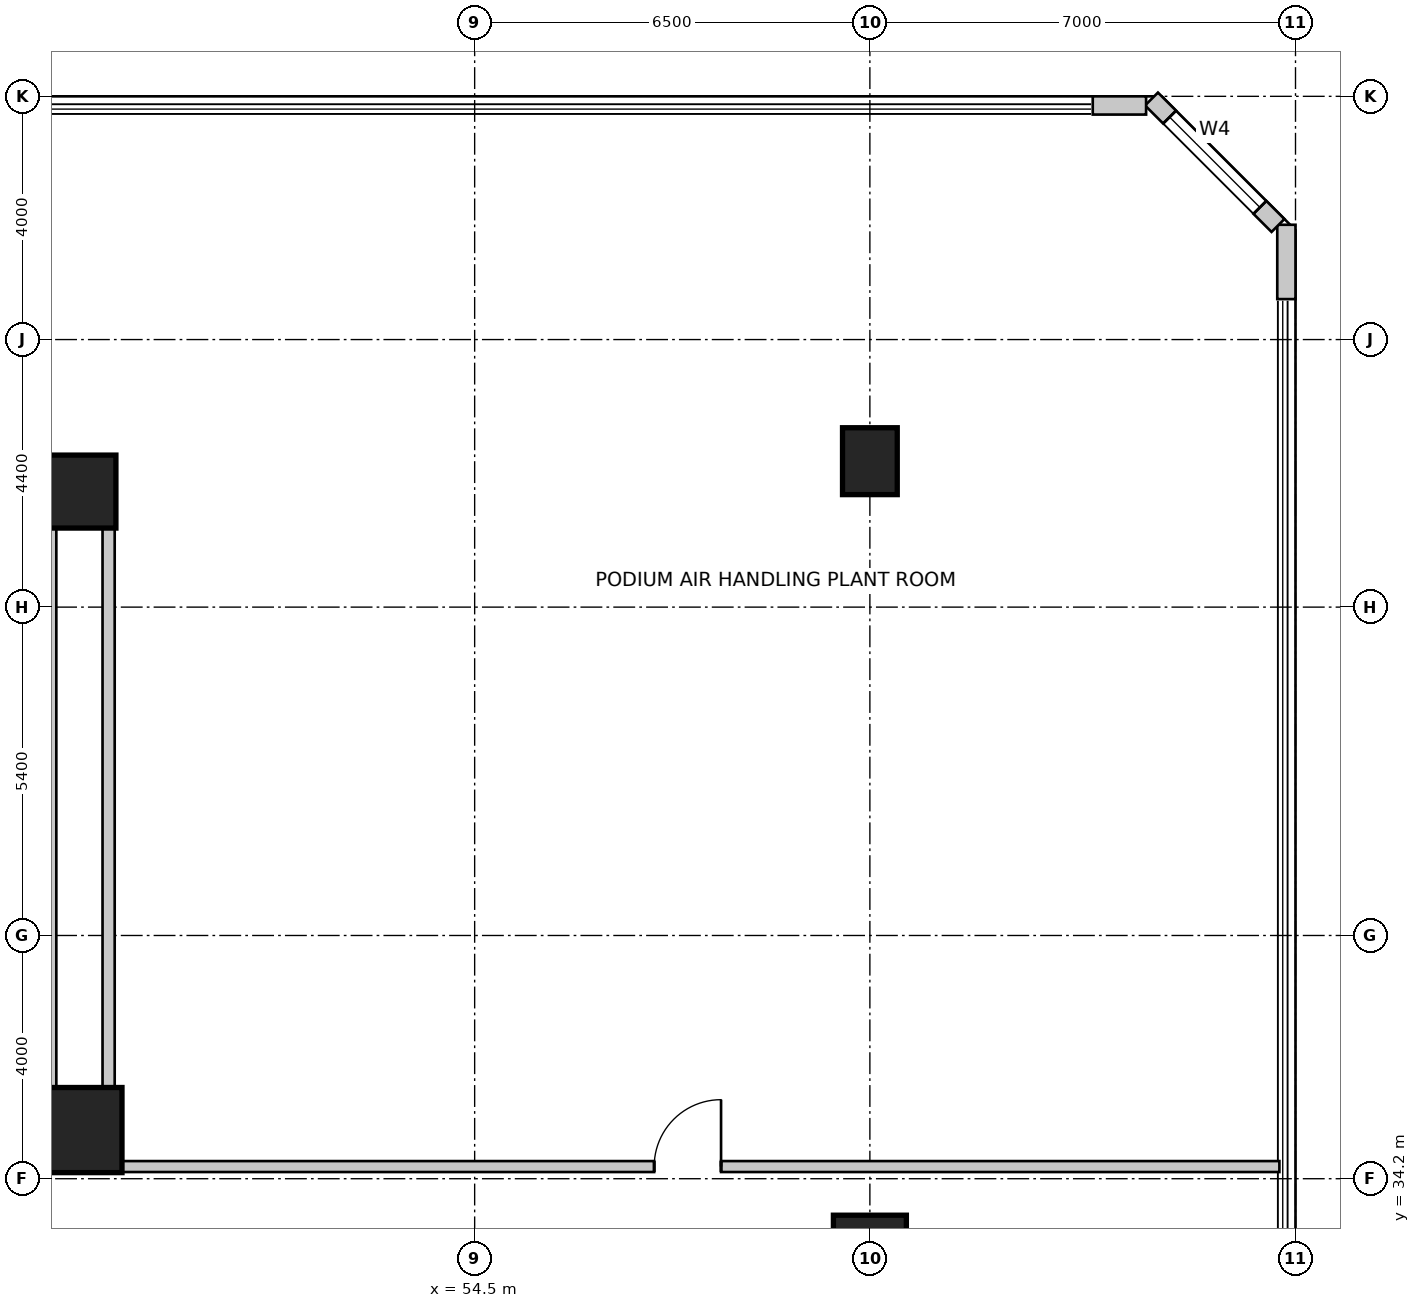
"""IFC4 building model, lengths in metres.
Left out: names, types, materials, properties, quantities, classifications, styles, units other than length and angle.
Written with IfcOpenShell. Run it as: python <this file> out.ifc"""

import sys

from ifc_helpers import new_model, si_unit, direction, frame, frame_2d, origin, origin_2d, place, context, subcontext, project, spatial, rectangle, extrude, source, transform, mapped, element, fill, save


model = new_model("IFC4")
c1 = context("Model", 3, precision=1e-05, world=origin(), true_north=direction((0.0, 1.0)))
c2 = subcontext(c1, "Body", "Model", "MODEL_VIEW")
j1 = project(units=[si_unit("LENGTHUNIT", "METRE"), si_unit("PLANEANGLEUNIT", "RADIAN")], contexts=[c1])
p1 = place(None, origin())
s1 = spatial("IfcSite", under=j1, at=p1, CompositionType="ELEMENT")
p2 = place(p1, origin())
s2 = spatial("IfcBuilding", under=s1, at=p2, CompositionType="ELEMENT")
p3 = place(p2, frame((0.0, 0.0, 21.6)))
s3 = spatial("IfcBuildingStorey", under=s2, at=p3, CompositionType="ELEMENT", Elevation=21.6)
m1 = source(origin(), c2, "Body", "SweptSolid", [
    extrude(rectangle(XDim=1.4, YDim=1.4, at=origin_2d()), origin(), (0.0, 0.0, 1.0), 5.4),
])
p4 = place(p3, frame((48.0, 35.0, 0.0), z_axis=(0.0, 0.0, 1.0), x_axis=(1.0, 0.0, 0.0)))
e1 = element("IfcColumn", 1, at=p4, inside=s3, PredefinedType="COLUMN", context=c2, shape_type="MappedRepresentation", body=[
    mapped(m1, transform((0.0, 0.0, 0.0), scale=1.0)),
])
m2 = source(origin(), c2, "Body", "SweptSolid", [
    extrude(rectangle(XDim=1.2, YDim=1.2, at=origin_2d()), origin(), (0.0, 0.0, 1.0), 5.4),
])
for number, where, z_axis, x_axis in (
    (2, (61.0, 33.0, 0.0), (0.0, 0.0, 1.0), (1.0, 0.0, 0.0)),
    (3, (48.0, 45.5, 0.0), (0.0, 0.0, 1.0), (1.0, 0.0, 0.0)),
):
    element("IfcColumn", number, at=place(p3, frame(where, z_axis=z_axis, x_axis=x_axis)), inside=s3, PredefinedType="COLUMN", context=c2, shape_type="MappedRepresentation", body=[
        mapped(m2, transform((0.0, 0.0, 0.0), scale=1.0)),
    ])
m3 = source(origin(), c2, "Body", "SweptSolid", [
    extrude(rectangle(XDim=0.9, YDim=1.1, at=origin_2d()), origin(), (0.0, 0.0, 1.0), 5.4),
])
p5 = place(p3, frame((61.0, 46.0, 0.0), z_axis=(0.0, 0.0, 1.0), x_axis=(1.0, 0.0, 0.0)))
e4 = element("IfcColumn", 4, at=p5, inside=s3, PredefinedType="COLUMN", context=c2, shape_type="MappedRepresentation", body=[
    mapped(m3, transform((0.0, 0.0, 0.0), scale=1.0)),
])
p6 = place(p3, frame((67.85, 48.665, 0.0), z_axis=(0.0, 0.0, 1.0), x_axis=(0.0, 1.0, 0.0)))
e5 = element("IfcWall", 5, at=p6, inside=s3, PredefinedType="SOLIDWALL", context=c2, shape_type="SweptSolid", body=[
    extrude(rectangle(XDim=1.223, YDim=0.3, at=frame_2d((0.611, 0.0))), origin(), (0.0, 0.0, 1.0), 5.05),
])
p7 = place(p3, frame((67.712, 49.876, 0.0), z_axis=(0.0, 0.0, 1.0), x_axis=(-0.707106781187, 0.707106781187, 0.0)))
e6 = element("IfcWall", 6, at=p7, inside=s3, PredefinedType="SOLIDWALL", context=c2, shape_type="SweptSolid", body=[
    extrude(rectangle(XDim=2.942, YDim=0.3, at=frame_2d((1.471, 0.0))), origin(), (0.0, 0.0, 1.0), 5.05),
])
m4 = source(origin(), c2, "Body", "SweptSolid", [
    extrude(rectangle(XDim=2.1, YDim=2.0, at=frame_2d((1.05, 1.0))), frame((0.0, 0.16, 0.0), z_axis=(0.0, -1.0, 0.0), x_axis=(1.0, 0.0, 0.0)), (0.0, 0.0, 1.0), 0.32),
])
p8 = place(p7, frame((0.421, 0.0, 0.85)))
e7 = element("IfcOpeningElement", 7, at=p8, cuts=e6, PredefinedType="OPENING", context=c2, shape_type="MappedRepresentation", body=[
    mapped(m4, transform((0.0, 0.0, 0.0), scale=1.0)),
])
p9 = place(p3, frame((65.543, 51.85, 0.0), z_axis=(0.0, 0.0, 1.0), x_axis=(-1.0, 0.0, 0.0)))
e8 = element("IfcWall", 8, at=p9, inside=s3, PredefinedType="SOLIDWALL", context=c2, shape_type="SweptSolid", body=[
    extrude(rectangle(XDim=0.877, YDim=0.3, at=frame_2d((0.439, 0.0))), origin(), (0.0, 0.0, 1.0), 5.05),
])
p10 = place(p3, frame((44.5, 34.4, 0.0), z_axis=(0.0, 0.0, 1.0), x_axis=(1.0, 0.0, 0.0)))
e9 = element("IfcWall", 9, at=p10, inside=s3, PredefinedType="PARTITIONING", context=c2, shape_type="SweptSolid", body=[
    extrude(rectangle(XDim=3.075, YDim=0.18, at=frame_2d((1.537, 0.0))), origin(), (0.0, 0.0, 1.0), 3.822),
])
p11 = place(p3, frame((48.39, 34.4, 0.0), z_axis=(0.0, 0.0, 1.0), x_axis=(1.0, 0.0, 0.0)))
e10 = element("IfcWall", 10, at=p11, inside=s3, PredefinedType="PARTITIONING", context=c2, shape_type="SweptSolid", body=[
    extrude(rectangle(XDim=19.345, YDim=0.18, at=frame_2d((9.673, 0.0))), origin(), (0.0, 0.0, 1.0), 3.822),
])
m5 = source(origin(), c2, "Body", "SweptSolid", [
    extrude(rectangle(XDim=1.1, YDim=2.15, at=frame_2d((0.55, 1.075))), frame((0.0, 0.1, 0.0), z_axis=(0.0, -1.0, 0.0), x_axis=(1.0, 0.0, 0.0)), (0.0, 0.0, 1.0), 0.2),
])
p12 = place(p11, frame((9.062, 0.0, 0.0)))
e11 = element("IfcOpeningElement", 11, at=p12, cuts=e10, PredefinedType="OPENING", context=c2, shape_type="MappedRepresentation", body=[
    mapped(m5, transform((0.0, 0.0, 0.0), scale=1.0)),
])
for number, where, z_axis, x_axis in (
    (12, (48.48, 46.0, 0.0), (0.0, 0.0, 1.0), (0.0, -1.0, 0.0)),
    (13, (47.52, 34.64, 0.0), (0.0, 0.0, 1.0), (0.0, 1.0, 0.0)),
):
    element("IfcWall", number, at=place(p3, frame(where, z_axis=z_axis, x_axis=x_axis)), inside=s3, PredefinedType="SOLIDWALL", context=c2, shape_type="SweptSolid", body=[
        extrude(rectangle(XDim=11.36, YDim=0.2, at=frame_2d((5.68, 0.0))), origin(), (0.0, 0.0, 1.0), 3.042),
    ])
m6 = source(origin(), c2, "Body", "SweptSolid", [
    extrude(rectangle(XDim=2.1, YDim=2.0, at=frame_2d((1.05, 1.0))), frame((0.0, -0.015, 0.0), z_axis=(0.0, -1.0, 0.0), x_axis=(1.0, 0.0, 0.0)), (0.0, 0.0, 1.0), 0.06),
])
p13 = place(p8, origin())
e14 = element("IfcWindow", 14, at=p13, inside=s3, PartitioningType="SINGLE_PANEL", PredefinedType="WINDOW", context=c2, shape_type="MappedRepresentation", body=[
    mapped(m6, transform((0.0, 0.0, 0.0), scale=1.0)),
])
fill(e7, e14)
m7 = source(origin(), c2, "Body", "SweptSolid", [
    extrude(rectangle(XDim=1.1, YDim=2.15, at=frame_2d((0.55, 1.075))), frame((0.0, 0.025, 0.0), z_axis=(0.0, -1.0, 0.0), x_axis=(1.0, 0.0, 0.0)), (0.0, 0.0, 1.0), 0.05),
])
p14 = place(p12, origin())
e15 = element("IfcDoor", 15, at=p14, inside=s3, OperationType="SINGLE_SWING_RIGHT", PredefinedType="DOOR", context=c2, shape_type="MappedRepresentation", body=[
    mapped(m7, transform((0.0, 0.0, 0.0), scale=1.0)),
])
fill(e11, e15)
save(model, sys.argv[1])
